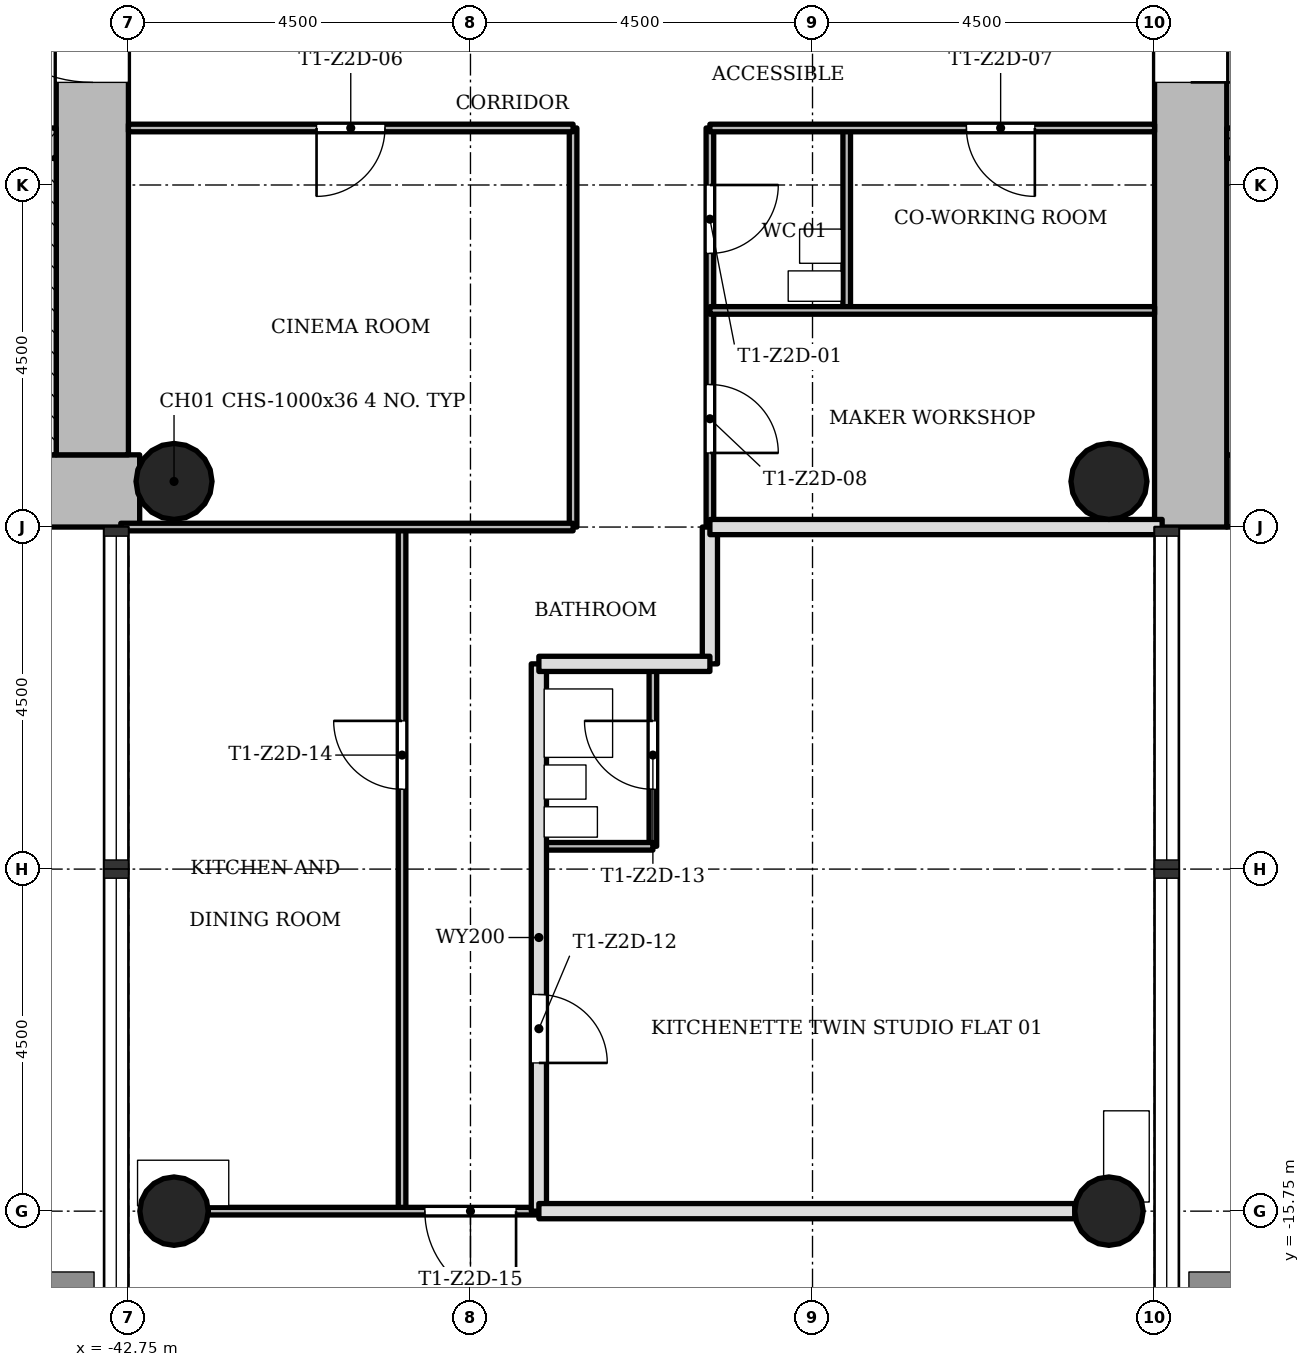
"""IFC4 building model, lengths in metres.
Left out: names, types, materials, properties, quantities, classifications, styles, units other than length and angle.
Written with IfcOpenShell. Run it as: python <this file> out.ifc"""

import sys

from ifc_helpers import new_model, si_unit, direction, frame, frame_2d, origin, origin_2d, place, context, subcontext, project, spatial, rectangle, hollow_circle, extrude, element, fill, save


model = new_model("IFC4")
c1 = context("Model", 3, precision=1e-05, world=origin(), true_north=direction((0.0, 1.0)))
c2 = subcontext(c1, "Body", "Model", "MODEL_VIEW")
j1 = project(units=[si_unit("LENGTHUNIT", "METRE"), si_unit("PLANEANGLEUNIT", "RADIAN")], contexts=[c1])
p1 = place(None, origin())
s1 = spatial("IfcSite", under=j1, at=p1, CompositionType="ELEMENT")
p2 = place(p1, origin())
s2 = spatial("IfcBuilding", under=s1, at=p2, CompositionType="ELEMENT")
p3 = place(p2, frame((0.0, 0.0, 120.8)))
s3 = spatial("IfcBuildingStorey", under=s2, at=p3, CompositionType="ELEMENT", Elevation=120.8)
p4 = place(p3, frame((-28.3, -6.275, 0.0), z_axis=(0.0, 0.0, 1.0), x_axis=(1.0, 0.0, 0.0)))
e1 = element("IfcWall", 1, at=p4, inside=s3, PredefinedType="SHEAR", context=c2, shape_type="SweptSolid", body=[
    extrude(rectangle(XDim=8.05, YDim=0.95, at=frame_2d((4.025, 0.0))), origin(), (0.0, 0.0, 1.0), 3.4),
])
p5 = place(p3, frame((-28.775, 5.8, 0.0), z_axis=(0.0, 0.0, 1.0), x_axis=(0.0, -1.0, 0.0)))
e2 = element("IfcWall", 2, at=p5, inside=s3, PredefinedType="SHEAR", context=c2, shape_type="SweptSolid", body=[
    extrude(rectangle(XDim=12.55, YDim=0.95, at=frame_2d((6.275, 0.0))), origin(), (0.0, 0.0, 1.0), 3.4),
])
p6 = place(p5, frame((4.9, 0.0, 0.0)))
e3 = element("IfcOpeningElement", 3, at=p6, cuts=e2, PredefinedType="OPENING", context=c2, shape_type="SweptSolid", body=[
    extrude(rectangle(XDim=1.8, YDim=2.1, at=frame_2d((0.9, 1.05))), frame((0.0, 0.485, 0.0), z_axis=(0.0, -1.0, 0.0), x_axis=(1.0, 0.0, 0.0)), (0.0, 0.0, 1.0), 0.97),
])
p7 = place(p3, frame((-28.3, -1.7, 0.0), z_axis=(0.0, 0.0, 1.0), x_axis=(1.0, 0.0, 0.0)))
e4 = element("IfcWall", 4, at=p7, inside=s3, PredefinedType="SHEAR", context=c2, shape_type="SweptSolid", body=[
    extrude(rectangle(XDim=7.1, YDim=0.4, at=frame_2d((3.55, 0.0))), origin(), (0.0, 0.0, 1.0), 3.4),
])
p8 = place(p7, frame((0.8, 0.0, 0.0)))
e5 = element("IfcOpeningElement", 5, at=p8, cuts=e4, PredefinedType="OPENING", context=c2, shape_type="SweptSolid", body=[
    extrude(rectangle(XDim=1.1, YDim=2.1, at=frame_2d((0.55, 1.05))), frame((0.0, 0.21, 0.0), z_axis=(0.0, -1.0, 0.0), x_axis=(1.0, 0.0, 0.0)), (0.0, 0.0, 1.0), 0.42),
])
p9 = place(p7, frame((3.0, 0.0, 0.0)))
e6 = element("IfcOpeningElement", 6, at=p9, cuts=e4, PredefinedType="OPENING", context=c2, shape_type="SweptSolid", body=[
    extrude(rectangle(XDim=1.1, YDim=2.1, at=frame_2d((0.55, 1.05))), frame((0.0, 0.21, 0.0), z_axis=(0.0, -1.0, 0.0), x_axis=(1.0, 0.0, 0.0)), (0.0, 0.0, 1.0), 0.42),
])
p10 = place(p7, frame((5.2, 0.0, 0.0)))
e7 = element("IfcOpeningElement", 7, at=p10, cuts=e4, PredefinedType="OPENING", context=c2, shape_type="SweptSolid", body=[
    extrude(rectangle(XDim=1.1, YDim=2.1, at=frame_2d((0.55, 1.05))), frame((0.0, 0.21, 0.0), z_axis=(0.0, -1.0, 0.0), x_axis=(1.0, 0.0, 0.0)), (0.0, 0.0, 1.0), 0.42),
])
p11 = place(p3, frame((-51.298, -6.275, 0.0), z_axis=(0.0, 0.0, 1.0), x_axis=(1.0, 0.0, 0.0)))
e8 = element("IfcWall", 8, at=p11, inside=s3, PredefinedType="SHEAR", context=c2, shape_type="SweptSolid", body=[
    extrude(rectangle(XDim=8.696, YDim=0.95, at=frame_2d((4.348, 0.0))), origin(), (0.0, 0.0, 1.0), 3.4),
])
p12 = place(p3, frame((-43.225, -5.8, 0.0), z_axis=(0.0, 0.0, 1.0), x_axis=(0.0, 1.0, 0.0)))
e9 = element("IfcWall", 9, at=p12, inside=s3, PredefinedType="SHEAR", context=c2, shape_type="SweptSolid", body=[
    extrude(rectangle(XDim=12.55, YDim=0.95, at=frame_2d((6.275, 0.0))), origin(), (0.0, 0.0, 1.0), 3.4),
])
p13 = place(p12, frame((4.9, 0.0, 0.0)))
e10 = element("IfcOpeningElement", 10, at=p13, cuts=e9, PredefinedType="OPENING", context=c2, shape_type="SweptSolid", body=[
    extrude(rectangle(XDim=1.8, YDim=2.1, at=frame_2d((0.9, 1.05))), frame((0.0, 0.485, 0.0), z_axis=(0.0, -1.0, 0.0), x_axis=(1.0, 0.0, 0.0)), (0.0, 0.0, 1.0), 0.97),
])
p14 = place(p3, frame((-50.8, -1.7, 0.0), z_axis=(0.0, 0.0, 1.0), x_axis=(1.0, 0.0, 0.0)))
e11 = element("IfcWall", 11, at=p14, inside=s3, PredefinedType="SHEAR", context=c2, shape_type="SweptSolid", body=[
    extrude(rectangle(XDim=7.1, YDim=0.4, at=frame_2d((3.55, 0.0))), origin(), (0.0, 0.0, 1.0), 3.4),
])
p15 = place(p14, frame((5.5, 0.0, 0.0)))
e12 = element("IfcOpeningElement", 12, at=p15, cuts=e11, PredefinedType="OPENING", context=c2, shape_type="SweptSolid", body=[
    extrude(rectangle(XDim=0.9, YDim=2.1, at=frame_2d((0.45, 1.05))), frame((0.0, 0.21, 0.0), z_axis=(0.0, -1.0, 0.0), x_axis=(1.0, 0.0, 0.0)), (0.0, 0.0, 1.0), 0.42),
])
for number, where, z_axis, x_axis in (
    (13, (-42.15, -15.75, 0.0), (0.0, 0.0, 1.0), (1.0, 0.0, 0.0)),
    (14, (-29.85, -15.75, 0.0), (0.0, 0.0, 1.0), (1.0, 0.0, 0.0)),
):
    element("IfcColumn", number, at=place(p3, frame(where, z_axis=z_axis, x_axis=x_axis)), inside=s3, PredefinedType="COLUMN", context=c2, shape_type="SweptSolid", body=[
        extrude(hollow_circle(Radius=0.45, WallThickness=0.032, at=origin_2d()), origin(), (0.0, 0.0, 1.0), 3.4),
    ])
for number, where, z_axis, x_axis in (
    (15, (-42.15, -6.15, 0.0), (0.0, 0.0, 1.0), (1.0, 0.0, 0.0)),
    (16, (-29.85, -6.15, 0.0), (0.0, 0.0, 1.0), (1.0, 0.0, 0.0)),
):
    element("IfcColumn", number, at=place(p3, frame(where, z_axis=z_axis, x_axis=x_axis)), inside=s3, PredefinedType="COLUMN", context=c2, shape_type="SweptSolid", body=[
        extrude(hollow_circle(Radius=0.5, WallThickness=0.036, at=origin_2d()), origin(), (0.0, 0.0, 1.0), 3.4),
    ])
p16 = place(p3, frame((-39.15, -15.75, 0.0), z_axis=(0.0, 0.0, 1.0), x_axis=(0.0, 1.0, 0.0)))
e17 = element("IfcWall", 17, at=p16, inside=s3, PredefinedType="PARTITIONING", context=c2, shape_type="SweptSolid", body=[
    extrude(rectangle(XDim=9.0, YDim=0.1, at=frame_2d((4.5, 0.0))), origin(), (0.0, 0.0, 1.0), 3.0),
])
p17 = place(p16, frame((5.55, 0.0, 0.0)))
e18 = element("IfcOpeningElement", 18, at=p17, cuts=e17, PredefinedType="OPENING", context=c2, shape_type="SweptSolid", body=[
    extrude(rectangle(XDim=0.9, YDim=2.1, at=frame_2d((0.45, 1.05))), frame((0.0, 0.06, 0.0), z_axis=(0.0, -1.0, 0.0), x_axis=(1.0, 0.0, 0.0)), (0.0, 0.0, 1.0), 0.12),
])
p18 = place(p3, frame((-37.35, -15.75, 0.0), z_axis=(0.0, 0.0, 1.0), x_axis=(0.0, 1.0, 0.0)))
e19 = element("IfcWall", 19, at=p18, inside=s3, PredefinedType="SOLIDWALL", context=c2, shape_type="SweptSolid", body=[
    extrude(rectangle(XDim=7.2, YDim=0.2, at=frame_2d((3.6, 0.0))), origin(), (0.0, 0.0, 1.0), 3.0),
])
p19 = place(p18, frame((1.95, 0.0, 0.0)))
e20 = element("IfcOpeningElement", 20, at=p19, cuts=e19, PredefinedType="OPENING", context=c2, shape_type="SweptSolid", body=[
    extrude(rectangle(XDim=0.9, YDim=2.1, at=frame_2d((0.45, 1.05))), frame((0.0, 0.11, 0.0), z_axis=(0.0, -1.0, 0.0), x_axis=(1.0, 0.0, 0.0)), (0.0, 0.0, 1.0), 0.22),
])
p20 = place(p3, frame((-36.9, -6.75, 0.0), z_axis=(0.0, 0.0, 1.0), x_axis=(0.0, 1.0, 0.0)))
e21 = element("IfcWall", 21, at=p20, inside=s3, PredefinedType="PARTITIONING", context=c2, shape_type="SweptSolid", body=[
    extrude(rectangle(XDim=5.25, YDim=0.1, at=frame_2d((2.625, 0.0))), origin(), (0.0, 0.0, 1.0), 3.0),
])
p21 = place(p3, frame((-35.85, -10.95, 0.0), z_axis=(0.0, 0.0, 1.0), x_axis=(0.0, 1.0, 0.0)))
e22 = element("IfcWall", 22, at=p21, inside=s3, PredefinedType="PARTITIONING", context=c2, shape_type="SweptSolid", body=[
    extrude(rectangle(XDim=2.4, YDim=0.1, at=frame_2d((1.2, 0.0))), origin(), (0.0, 0.0, 1.0), 3.0),
])
p22 = place(p21, frame((0.75, 0.0, 0.0)))
e23 = element("IfcOpeningElement", 23, at=p22, cuts=e22, PredefinedType="OPENING", context=c2, shape_type="SweptSolid", body=[
    extrude(rectangle(XDim=0.9, YDim=2.1, at=frame_2d((0.45, 1.05))), frame((0.0, 0.06, 0.0), z_axis=(0.0, -1.0, 0.0), x_axis=(1.0, 0.0, 0.0)), (0.0, 0.0, 1.0), 0.12),
])
p23 = place(p3, frame((-35.1, -6.75, 0.0), z_axis=(0.0, 0.0, 1.0), x_axis=(0.0, 1.0, 0.0)))
e24 = element("IfcWall", 24, at=p23, inside=s3, PredefinedType="PARTITIONING", context=c2, shape_type="SweptSolid", body=[
    extrude(rectangle(XDim=5.25, YDim=0.1, at=frame_2d((2.625, 0.0))), origin(), (0.0, 0.0, 1.0), 3.0),
])
p24 = place(p23, frame((3.6, 0.0, 0.0)))
e25 = element("IfcOpeningElement", 25, at=p24, cuts=e24, PredefinedType="OPENING", context=c2, shape_type="SweptSolid", body=[
    extrude(rectangle(XDim=0.9, YDim=2.1, at=frame_2d((0.45, 1.05))), frame((0.0, 0.06, 0.0), z_axis=(0.0, -1.0, 0.0), x_axis=(1.0, 0.0, 0.0)), (0.0, 0.0, 1.0), 0.12),
])
p25 = place(p23, frame((0.975, 0.0, 0.0)))
e26 = element("IfcOpeningElement", 26, at=p25, cuts=e24, PredefinedType="OPENING", context=c2, shape_type="SweptSolid", body=[
    extrude(rectangle(XDim=0.9, YDim=2.1, at=frame_2d((0.45, 1.05))), frame((0.0, 0.06, 0.0), z_axis=(0.0, -1.0, 0.0), x_axis=(1.0, 0.0, 0.0)), (0.0, 0.0, 1.0), 0.12),
])
p26 = place(p3, frame((-35.1, -8.55, 0.0), z_axis=(0.0, 0.0, 1.0), x_axis=(0.0, 1.0, 0.0)))
e27 = element("IfcWall", 27, at=p26, inside=s3, PredefinedType="SOLIDWALL", context=c2, shape_type="SweptSolid", body=[
    extrude(rectangle(XDim=1.8, YDim=0.2, at=frame_2d((0.9, 0.0))), origin(), (0.0, 0.0, 1.0), 3.0),
])
p27 = place(p3, frame((-33.3, -3.9, 0.0), z_axis=(0.0, 0.0, 1.0), x_axis=(0.0, 1.0, 0.0)))
e28 = element("IfcWall", 28, at=p27, inside=s3, PredefinedType="PARTITIONING", context=c2, shape_type="SweptSolid", body=[
    extrude(rectangle(XDim=2.4, YDim=0.1, at=frame_2d((1.2, 0.0))), origin(), (0.0, 0.0, 1.0), 3.0),
])
p28 = place(p3, frame((-41.7, -15.75, 0.0), z_axis=(0.0, 0.0, 1.0), x_axis=(1.0, 0.0, 0.0)))
e29 = element("IfcWall", 29, at=p28, inside=s3, PredefinedType="PARTITIONING", context=c2, shape_type="SweptSolid", body=[
    extrude(rectangle(XDim=4.35, YDim=0.1, at=frame_2d((2.175, 0.0))), origin(), (0.0, 0.0, 1.0), 3.0),
])
p29 = place(p28, frame((2.85, 0.0, 0.0)))
e30 = element("IfcOpeningElement", 30, at=p29, cuts=e29, PredefinedType="OPENING", context=c2, shape_type="SweptSolid", body=[
    extrude(rectangle(XDim=1.2, YDim=2.1, at=frame_2d((0.6, 1.05))), frame((0.0, 0.06, 0.0), z_axis=(0.0, -1.0, 0.0), x_axis=(1.0, 0.0, 0.0)), (0.0, 0.0, 1.0), 0.12),
])
p30 = place(p3, frame((-37.35, -15.75, 0.0), z_axis=(0.0, 0.0, 1.0), x_axis=(1.0, 0.0, 0.0)))
e31 = element("IfcWall", 31, at=p30, inside=s3, PredefinedType="SOLIDWALL", context=c2, shape_type="SweptSolid", body=[
    extrude(rectangle(XDim=7.05, YDim=0.2, at=frame_2d((3.525, 0.0))), origin(), (0.0, 0.0, 1.0), 3.0),
])
p31 = place(p3, frame((-37.35, -10.95, 0.0), z_axis=(0.0, 0.0, 1.0), x_axis=(1.0, 0.0, 0.0)))
e32 = element("IfcWall", 32, at=p31, inside=s3, PredefinedType="PARTITIONING", context=c2, shape_type="SweptSolid", body=[
    extrude(rectangle(XDim=1.5, YDim=0.1, at=frame_2d((0.75, 0.0))), origin(), (0.0, 0.0, 1.0), 3.0),
])
p32 = place(p3, frame((-37.35, -8.55, 0.0), z_axis=(0.0, 0.0, 1.0), x_axis=(1.0, 0.0, 0.0)))
e33 = element("IfcWall", 33, at=p32, inside=s3, PredefinedType="SOLIDWALL", context=c2, shape_type="SweptSolid", body=[
    extrude(rectangle(XDim=2.25, YDim=0.2, at=frame_2d((1.125, 0.0))), origin(), (0.0, 0.0, 1.0), 3.0),
])
p33 = place(p3, frame((-42.85, -6.75, 0.0), z_axis=(0.0, 0.0, 1.0), x_axis=(1.0, 0.0, 0.0)))
e34 = element("IfcWall", 34, at=p33, inside=s3, PredefinedType="PARTITIONING", context=c2, shape_type="SweptSolid", body=[
    extrude(rectangle(XDim=5.95, YDim=0.1, at=frame_2d((2.975, 0.0))), origin(), (0.0, 0.0, 1.0), 3.0),
])
p34 = place(p3, frame((-35.1, -6.75, 0.0), z_axis=(0.0, 0.0, 1.0), x_axis=(1.0, 0.0, 0.0)))
e35 = element("IfcWall", 35, at=p34, inside=s3, PredefinedType="SOLIDWALL", context=c2, shape_type="SweptSolid", body=[
    extrude(rectangle(XDim=5.95, YDim=0.2, at=frame_2d((2.975, 0.0))), origin(), (0.0, 0.0, 1.0), 3.0),
])
p35 = place(p3, frame((-35.1, -3.9, 0.0), z_axis=(0.0, 0.0, 1.0), x_axis=(1.0, 0.0, 0.0)))
e36 = element("IfcWall", 36, at=p35, inside=s3, PredefinedType="PARTITIONING", context=c2, shape_type="SweptSolid", body=[
    extrude(rectangle(XDim=5.85, YDim=0.1, at=frame_2d((2.925, 0.0))), origin(), (0.0, 0.0, 1.0), 3.0),
])
p36 = place(p3, frame((-42.75, -1.5, 0.0), z_axis=(0.0, 0.0, 1.0), x_axis=(1.0, 0.0, 0.0)))
e37 = element("IfcWall", 37, at=p36, inside=s3, PredefinedType="PARTITIONING", context=c2, shape_type="SweptSolid", body=[
    extrude(rectangle(XDim=5.85, YDim=0.1, at=frame_2d((2.925, 0.0))), origin(), (0.0, 0.0, 1.0), 3.0),
])
p37 = place(p36, frame((2.475, 0.0, 0.0)))
e38 = element("IfcOpeningElement", 38, at=p37, cuts=e37, PredefinedType="OPENING", context=c2, shape_type="SweptSolid", body=[
    extrude(rectangle(XDim=0.9, YDim=2.1, at=frame_2d((0.45, 1.05))), frame((0.0, 0.06, 0.0), z_axis=(0.0, -1.0, 0.0), x_axis=(1.0, 0.0, 0.0)), (0.0, 0.0, 1.0), 0.12),
])
p38 = place(p3, frame((-35.1, -1.5, 0.0), z_axis=(0.0, 0.0, 1.0), x_axis=(1.0, 0.0, 0.0)))
e39 = element("IfcWall", 39, at=p38, inside=s3, PredefinedType="PARTITIONING", context=c2, shape_type="SweptSolid", body=[
    extrude(rectangle(XDim=5.85, YDim=0.1, at=frame_2d((2.925, 0.0))), origin(), (0.0, 0.0, 1.0), 3.0),
])
p39 = place(p38, frame((3.375, 0.0, 0.0)))
e40 = element("IfcOpeningElement", 40, at=p39, cuts=e39, PredefinedType="OPENING", context=c2, shape_type="SweptSolid", body=[
    extrude(rectangle(XDim=0.9, YDim=2.1, at=frame_2d((0.45, 1.05))), frame((0.0, 0.06, 0.0), z_axis=(0.0, -1.0, 0.0), x_axis=(1.0, 0.0, 0.0)), (0.0, 0.0, 1.0), 0.12),
])
p40 = place(p3, frame((-43.825, -1.9, 0.0), z_axis=(0.0, 0.0, 1.0), x_axis=(0.0, -1.0, 0.0)))
e41 = element("IfcWall", 41, at=p40, inside=s3, PredefinedType="SHEAR", context=c2, shape_type="SweptSolid", body=[
    extrude(rectangle(XDim=3.9, YDim=0.25, at=frame_2d((1.95, 0.0))), origin(), (0.0, 0.0, 1.0), 3.4),
])
p41 = place(p24, origin())
e42 = element("IfcDoor", 42, at=p41, inside=s3, OperationType="SINGLE_SWING_RIGHT", PredefinedType="DOOR", context=c2, shape_type="SweptSolid", body=[
    extrude(rectangle(XDim=0.9, YDim=2.1, at=frame_2d((0.45, 1.05))), frame((0.0, 0.025, 0.0), z_axis=(0.0, -1.0, 0.0), x_axis=(1.0, 0.0, 0.0)), (0.0, 0.0, 1.0), 0.05),
])
fill(e25, e42)
p42 = place(p37, origin())
e43 = element("IfcDoor", 43, at=p42, inside=s3, OperationType="SINGLE_SWING_LEFT", PredefinedType="DOOR", context=c2, shape_type="SweptSolid", body=[
    extrude(rectangle(XDim=0.9, YDim=2.1, at=frame_2d((0.45, 1.05))), frame((0.0, 0.025, 0.0), z_axis=(0.0, -1.0, 0.0), x_axis=(1.0, 0.0, 0.0)), (0.0, 0.0, 1.0), 0.05),
])
fill(e38, e43)
p43 = place(p39, origin())
e44 = element("IfcDoor", 44, at=p43, inside=s3, OperationType="SINGLE_SWING_RIGHT", PredefinedType="DOOR", context=c2, shape_type="SweptSolid", body=[
    extrude(rectangle(XDim=0.9, YDim=2.1, at=frame_2d((0.45, 1.05))), frame((0.0, 0.025, 0.0), z_axis=(0.0, -1.0, 0.0), x_axis=(1.0, 0.0, 0.0)), (0.0, 0.0, 1.0), 0.05),
])
fill(e40, e44)
p44 = place(p25, origin())
e45 = element("IfcDoor", 45, at=p44, inside=s3, OperationType="SINGLE_SWING_LEFT", PredefinedType="DOOR", context=c2, shape_type="SweptSolid", body=[
    extrude(rectangle(XDim=0.9, YDim=2.1, at=frame_2d((0.45, 1.05))), frame((0.0, 0.025, 0.0), z_axis=(0.0, -1.0, 0.0), x_axis=(1.0, 0.0, 0.0)), (0.0, 0.0, 1.0), 0.05),
])
fill(e26, e45)
p45 = place(p19, origin())
e46 = element("IfcDoor", 46, at=p45, inside=s3, OperationType="SINGLE_SWING_LEFT", PredefinedType="DOOR", context=c2, shape_type="SweptSolid", body=[
    extrude(rectangle(XDim=0.9, YDim=2.1, at=frame_2d((0.45, 1.05))), frame((0.0, 0.025, 0.0), z_axis=(0.0, -1.0, 0.0), x_axis=(1.0, 0.0, 0.0)), (0.0, 0.0, 1.0), 0.05),
])
fill(e20, e46)
p46 = place(p22, origin())
e47 = element("IfcDoor", 47, at=p46, inside=s3, OperationType="SINGLE_SWING_LEFT", PredefinedType="DOOR", context=c2, shape_type="SweptSolid", body=[
    extrude(rectangle(XDim=0.9, YDim=2.1, at=frame_2d((0.45, 1.05))), frame((0.0, 0.025, 0.0), z_axis=(0.0, -1.0, 0.0), x_axis=(1.0, 0.0, 0.0)), (0.0, 0.0, 1.0), 0.05),
])
fill(e23, e47)
p47 = place(p17, origin())
e48 = element("IfcDoor", 48, at=p47, inside=s3, OperationType="SINGLE_SWING_LEFT", PredefinedType="DOOR", context=c2, shape_type="SweptSolid", body=[
    extrude(rectangle(XDim=0.9, YDim=2.1, at=frame_2d((0.45, 1.05))), frame((0.0, 0.025, 0.0), z_axis=(0.0, -1.0, 0.0), x_axis=(1.0, 0.0, 0.0)), (0.0, 0.0, 1.0), 0.05),
])
fill(e18, e48)
p48 = place(p29, origin())
e49 = element("IfcDoor", 49, at=p48, inside=s3, OperationType="SINGLE_SWING_RIGHT", PredefinedType="DOOR", context=c2, shape_type="SweptSolid", body=[
    extrude(rectangle(XDim=1.2, YDim=2.1, at=frame_2d((0.6, 1.05))), frame((0.0, 0.025, 0.0), z_axis=(0.0, -1.0, 0.0), x_axis=(1.0, 0.0, 0.0)), (0.0, 0.0, 1.0), 0.05),
])
fill(e30, e49)
p49 = place(p6, origin())
e50 = element("IfcDoor", 50, at=p49, inside=s3, OperationType="SINGLE_SWING_LEFT", PredefinedType="DOOR", context=c2, shape_type="SweptSolid", body=[
    extrude(rectangle(XDim=1.8, YDim=2.1, at=frame_2d((0.9, 1.05))), frame((0.0, 0.025, 0.0), z_axis=(0.0, -1.0, 0.0), x_axis=(1.0, 0.0, 0.0)), (0.0, 0.0, 1.0), 0.05),
])
fill(e3, e50)
p50 = place(p13, origin())
e51 = element("IfcDoor", 51, at=p50, inside=s3, OperationType="SINGLE_SWING_LEFT", PredefinedType="DOOR", context=c2, shape_type="SweptSolid", body=[
    extrude(rectangle(XDim=1.8, YDim=2.1, at=frame_2d((0.9, 1.05))), frame((0.0, 0.025, 0.0), z_axis=(0.0, -1.0, 0.0), x_axis=(1.0, 0.0, 0.0)), (0.0, 0.0, 1.0), 0.05),
])
fill(e10, e51)
save(model, sys.argv[1])
